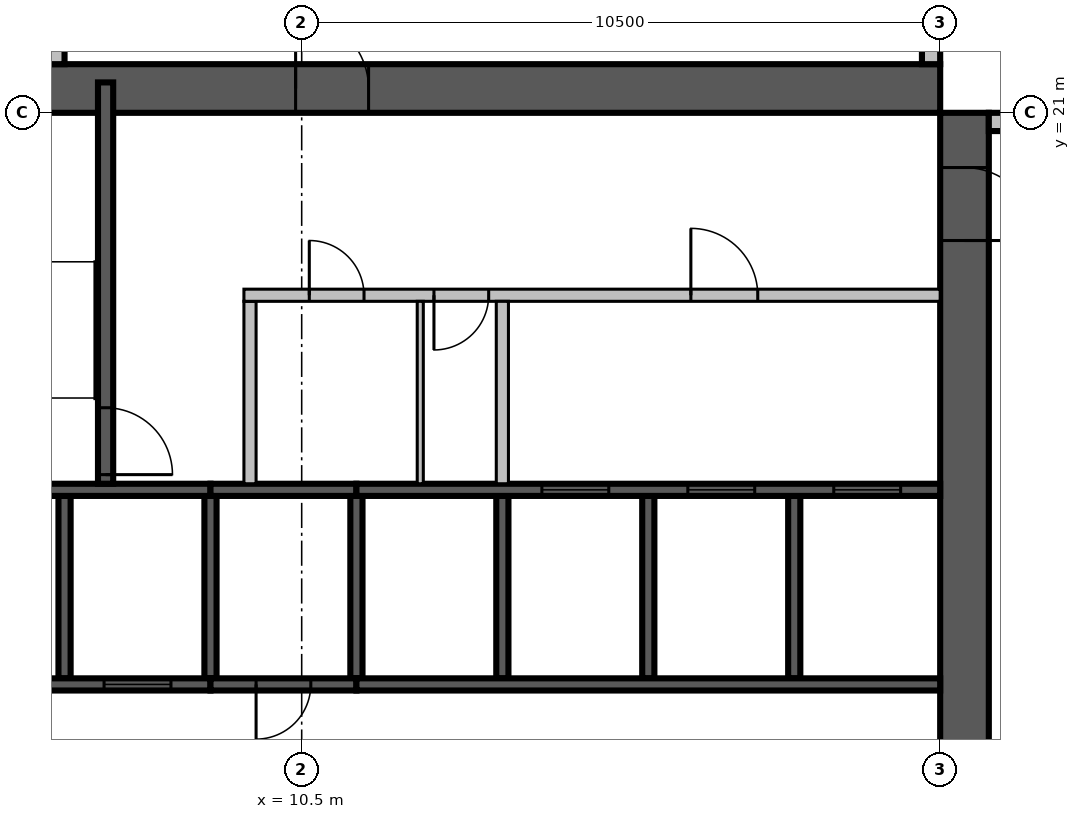
"""IFC4 building model, lengths in metres.
Left out: names, types, materials, properties, quantities, classifications, styles, units other than length and angle.
Written with IfcOpenShell. Run it as: python <this file> out.ifc"""

import sys

from ifc_helpers import new_model, si_unit, direction, frame, frame_2d, origin, place, context, subcontext, project, spatial, rectangle, extrude, source, transform, mapped, element, fill, save


model = new_model("IFC4")
c1 = context("Model", 3, precision=1e-05, world=origin(), true_north=direction((0.0, 1.0)))
c2 = subcontext(c1, "Body", "Model", "MODEL_VIEW")
j1 = project(units=[si_unit("LENGTHUNIT", "METRE"), si_unit("PLANEANGLEUNIT", "RADIAN")], contexts=[c1])
p1 = place(None, origin())
s1 = spatial("IfcSite", under=j1, at=p1, CompositionType="ELEMENT")
p2 = place(p1, origin())
s2 = spatial("IfcBuilding", under=s1, at=p2, CompositionType="ELEMENT")
p3 = place(p2, frame((0.0, 0.0, 181.6)))
s3 = spatial("IfcBuildingStorey", under=s2, at=p3, CompositionType="ELEMENT", Elevation=181.6)
m1 = source(origin(), c2, "Body", "SweptSolid", [
    extrude(rectangle(XDim=16.8, YDim=0.8, at=frame_2d((8.4, 0.0))), origin(), (0.0, 0.0, 1.0), 3.8),
])
p4 = place(p3, frame((21.4, 4.2, 0.0), z_axis=(0.0, 0.0, 1.0), x_axis=(0.0, 1.0, 0.0)))
e1 = element("IfcWall", 1, at=p4, inside=s3, PredefinedType="SHEAR", context=c2, shape_type="MappedRepresentation", body=[
    mapped(m1, transform((0.0, 0.0, 0.0), scale=1.0)),
])
m2 = source(origin(), c2, "Body", "SweptSolid", [
    extrude(rectangle(XDim=2.2, YDim=2.1, at=frame_2d((1.1, 1.05))), frame((0.0, 0.41, 0.0), z_axis=(0.0, -1.0, 0.0), x_axis=(1.0, 0.0, 0.0)), (0.0, 0.0, 1.0), 0.82),
])
p5 = place(p4, frame((4.2, 0.0, 0.0)))
e2 = element("IfcOpeningElement", 2, at=p5, cuts=e1, PredefinedType="OPENING", context=c2, shape_type="MappedRepresentation", body=[
    mapped(m2, transform((0.0, 0.0, 0.0), scale=1.0)),
])
m3 = source(origin(), c2, "Body", "SweptSolid", [
    extrude(rectangle(XDim=1.2, YDim=2.1, at=frame_2d((0.6, 1.05))), frame((0.0, 0.41, 0.0), z_axis=(0.0, -1.0, 0.0), x_axis=(1.0, 0.0, 0.0)), (0.0, 0.0, 1.0), 0.82),
])
p6 = place(p4, frame((14.7, 0.0, 0.0)))
e3 = element("IfcOpeningElement", 3, at=p6, cuts=e1, PredefinedType="OPENING", context=c2, shape_type="MappedRepresentation", body=[
    mapped(m3, transform((0.0, 0.0, 0.0), scale=1.0)),
])
p7 = place(p3, frame((4.2, 21.4, 0.0), z_axis=(0.0, 0.0, 1.0), x_axis=(1.0, 0.0, 0.0)))
e4 = element("IfcWall", 4, at=p7, inside=s3, PredefinedType="SHEAR", context=c2, shape_type="MappedRepresentation", body=[
    mapped(m1, transform((0.0, 0.0, 0.0), scale=1.0)),
])
p8 = place(p7, frame((6.2, 0.0, 0.0)))
e5 = element("IfcOpeningElement", 5, at=p8, cuts=e4, PredefinedType="OPENING", context=c2, shape_type="MappedRepresentation", body=[
    mapped(m3, transform((0.0, 0.0, 0.0), scale=1.0)),
])
m4 = source(origin(), c2, "Body", "SweptSolid", [
    extrude(rectangle(XDim=7.15, YDim=0.3, at=frame_2d((3.575, 0.0))), origin(), (0.0, 0.0, 1.0), 3.4),
])
p9 = place(p3, frame((28.95, 20.85, 0.0), z_axis=(0.0, 0.0, 1.0), x_axis=(-1.0, 0.0, 0.0)))
e6 = element("IfcWall", 6, at=p9, inside=s3, PredefinedType="STANDARD", context=c2, shape_type="MappedRepresentation", body=[
    mapped(m4, transform((0.0, 0.0, 0.0), scale=1.0)),
])
m5 = source(origin(), c2, "Body", "SweptSolid", [
    extrude(rectangle(XDim=3.0, YDim=2.3, at=frame_2d((1.5, 1.15))), frame((0.0, 0.16, 0.0), z_axis=(0.0, -1.0, 0.0), x_axis=(1.0, 0.0, 0.0)), (0.0, 0.0, 1.0), 0.32),
])
p10 = place(p9, frame((0.15, 0.0, 0.6)))
e7 = element("IfcOpeningElement", 7, at=p10, cuts=e6, PredefinedType="OPENING", context=c2, shape_type="MappedRepresentation", body=[
    mapped(m5, transform((0.0, 0.0, 0.0), scale=1.0)),
])
p11 = place(p3, frame((20.85, 21.8, 0.0), z_axis=(0.0, 0.0, 1.0), x_axis=(0.0, 1.0, 0.0)))
e8 = element("IfcWall", 8, at=p11, inside=s3, PredefinedType="STANDARD", context=c2, shape_type="MappedRepresentation", body=[
    mapped(m4, transform((0.0, 0.0, 0.0), scale=1.0)),
])
p12 = place(p11, frame((4.0, 0.0, 0.6)))
e9 = element("IfcOpeningElement", 9, at=p12, cuts=e8, PredefinedType="OPENING", context=c2, shape_type="MappedRepresentation", body=[
    mapped(m5, transform((0.0, 0.0, 0.0), scale=1.0)),
])
p13 = place(p3, frame((6.45, 30.4, 0.0), z_axis=(0.0, 0.0, 1.0), x_axis=(0.0, -1.0, 0.0)))
e10 = element("IfcWall", 10, at=p13, inside=s3, PredefinedType="STANDARD", context=c2, shape_type="SweptSolid", body=[
    extrude(rectangle(XDim=8.6, YDim=0.3, at=frame_2d((4.3, 0.0))), origin(), (0.0, 0.0, 1.0), 3.4),
])
m6 = source(origin(), c2, "Body", "SweptSolid", [
    extrude(rectangle(XDim=1.8, YDim=2.3, at=frame_2d((0.9, 1.15))), frame((0.0, 0.16, 0.0), z_axis=(0.0, -1.0, 0.0), x_axis=(1.0, 0.0, 0.0)), (0.0, 0.0, 1.0), 0.32),
])
p14 = place(p13, frame((1.438, 0.0, 0.6)))
e11 = element("IfcOpeningElement", 11, at=p14, cuts=e10, PredefinedType="OPENING", context=c2, shape_type="MappedRepresentation", body=[
    mapped(m6, transform((0.0, 0.0, 0.0), scale=1.0)),
])
m7 = source(origin(), c2, "Body", "SweptSolid", [
    extrude(rectangle(XDim=1.2, YDim=2.3, at=frame_2d((0.6, 1.15))), frame((0.0, 0.16, 0.0), z_axis=(0.0, -1.0, 0.0), x_axis=(1.0, 0.0, 0.0)), (0.0, 0.0, 1.0), 0.32),
])
p15 = place(p13, frame((5.013, 0.0, 0.6)))
e12 = element("IfcOpeningElement", 12, at=p15, cuts=e10, PredefinedType="OPENING", context=c2, shape_type="MappedRepresentation", body=[
    mapped(m7, transform((0.0, 0.0, 0.0), scale=1.0)),
])
m8 = source(origin(), c2, "Body", "SweptSolid", [
    extrude(rectangle(XDim=3.0, YDim=0.2, at=frame_2d((1.5, 0.0))), origin(), (0.0, 0.0, 1.0), 3.8),
])
p16 = place(p3, frame((6.6, 11.7, 0.0), z_axis=(0.0, 0.0, 1.0), x_axis=(0.0, 1.0, 0.0)))
e13 = element("IfcWall", 13, at=p16, inside=s3, PredefinedType="SOLIDWALL", context=c2, shape_type="MappedRepresentation", body=[
    mapped(m8, transform((0.0, 0.0, 0.0), scale=1.0)),
])
m9 = source(origin(), c2, "Body", "SweptSolid", [
    extrude(rectangle(XDim=3.0, YDim=0.2, at=frame_2d((1.5, 0.0))), origin(), (0.0, 0.0, 1.0), 3.4),
])
for number, where, z_axis, x_axis in (
    (14, (9.0, 11.7, 0.0), (0.0, 0.0, 1.0), (0.0, 1.0, 0.0)),
    (15, (11.4, 11.7, 0.0), (0.0, 0.0, 1.0), (0.0, 1.0, 0.0)),
):
    element("IfcWall", number, at=place(p3, frame(where, z_axis=z_axis, x_axis=x_axis)), inside=s3, PredefinedType="SOLIDWALL", context=c2, shape_type="MappedRepresentation", body=[
        mapped(m9, transform((0.0, 0.0, 0.0), scale=1.0)),
    ])
for number, where, z_axis, x_axis in (
    (16, (13.8, 11.7, 0.0), (0.0, 0.0, 1.0), (0.0, 1.0, 0.0)),
    (17, (16.2, 11.7, 0.0), (0.0, 0.0, 1.0), (0.0, 1.0, 0.0)),
    (18, (18.6, 11.7, 0.0), (0.0, 0.0, 1.0), (0.0, 1.0, 0.0)),
):
    element("IfcWall", number, at=place(p3, frame(where, z_axis=z_axis, x_axis=x_axis)), inside=s3, PredefinedType="SOLIDWALL", context=c2, shape_type="MappedRepresentation", body=[
        mapped(m8, transform((0.0, 0.0, 0.0), scale=1.0)),
    ])
m10 = source(origin(), c2, "Body", "SweptSolid", [
    extrude(rectangle(XDim=4.8, YDim=0.2, at=frame_2d((2.4, 0.0))), origin(), (0.0, 0.0, 1.0), 3.8),
])
p17 = place(p3, frame((4.2, 11.6, 0.0), z_axis=(0.0, 0.0, 1.0), x_axis=(1.0, 0.0, 0.0)))
e19 = element("IfcWall", 19, at=p17, inside=s3, PredefinedType="SOLIDWALL", context=c2, shape_type="MappedRepresentation", body=[
    mapped(m10, transform((0.0, 0.0, 0.0), scale=1.0)),
])
m11 = source(origin(), c2, "Body", "SweptSolid", [
    extrude(rectangle(XDim=1.1, YDim=2.1, at=frame_2d((0.55, 1.05))), frame((0.0, 0.11, 0.0), z_axis=(0.0, -1.0, 0.0), x_axis=(1.0, 0.0, 0.0)), (0.0, 0.0, 1.0), 0.22),
])
p18 = place(p17, frame((0.65, 0.0, 0.0)))
e20 = element("IfcOpeningElement", 20, at=p18, cuts=e19, PredefinedType="OPENING", context=c2, shape_type="MappedRepresentation", body=[
    mapped(m11, transform((0.0, 0.0, 0.0), scale=1.0)),
])
p19 = place(p17, frame((3.05, 0.0, 0.0)))
e21 = element("IfcOpeningElement", 21, at=p19, cuts=e19, PredefinedType="OPENING", context=c2, shape_type="MappedRepresentation", body=[
    mapped(m11, transform((0.0, 0.0, 0.0), scale=1.0)),
])
m12 = source(origin(), c2, "Body", "SweptSolid", [
    extrude(rectangle(XDim=2.4, YDim=0.2, at=frame_2d((1.2, 0.0))), origin(), (0.0, 0.0, 1.0), 3.4),
])
p20 = place(p3, frame((9.0, 11.6, 0.0), z_axis=(0.0, 0.0, 1.0), x_axis=(1.0, 0.0, 0.0)))
e22 = element("IfcWall", 22, at=p20, inside=s3, PredefinedType="SOLIDWALL", context=c2, shape_type="MappedRepresentation", body=[
    mapped(m12, transform((0.0, 0.0, 0.0), scale=1.0)),
])
m13 = source(origin(), c2, "Body", "SweptSolid", [
    extrude(rectangle(XDim=0.9, YDim=2.1, at=frame_2d((0.45, 1.05))), frame((0.0, 0.11, 0.0), z_axis=(0.0, -1.0, 0.0), x_axis=(1.0, 0.0, 0.0)), (0.0, 0.0, 1.0), 0.22),
])
p21 = place(p20, frame((0.75, 0.0, 0.0)))
e23 = element("IfcOpeningElement", 23, at=p21, cuts=e22, PredefinedType="OPENING", context=c2, shape_type="MappedRepresentation", body=[
    mapped(m13, transform((0.0, 0.0, 0.0), scale=1.0)),
])
m14 = source(origin(), c2, "Body", "SweptSolid", [
    extrude(rectangle(XDim=9.6, YDim=0.2, at=frame_2d((4.8, 0.0))), origin(), (0.0, 0.0, 1.0), 3.8),
])
p22 = place(p3, frame((11.4, 11.6, 0.0), z_axis=(0.0, 0.0, 1.0), x_axis=(1.0, 0.0, 0.0)))
e24 = element("IfcWall", 24, at=p22, inside=s3, PredefinedType="SOLIDWALL", context=c2, shape_type="MappedRepresentation", body=[
    mapped(m14, transform((0.0, 0.0, 0.0), scale=1.0)),
])
p23 = place(p3, frame((4.2, 14.8, 0.0), z_axis=(0.0, 0.0, 1.0), x_axis=(1.0, 0.0, 0.0)))
e25 = element("IfcWall", 25, at=p23, inside=s3, PredefinedType="SOLIDWALL", context=c2, shape_type="MappedRepresentation", body=[
    mapped(m10, transform((0.0, 0.0, 0.0), scale=1.0)),
])
p24 = place(p3, frame((9.0, 14.8, 0.0), z_axis=(0.0, 0.0, 1.0), x_axis=(1.0, 0.0, 0.0)))
e26 = element("IfcWall", 26, at=p24, inside=s3, PredefinedType="SOLIDWALL", context=c2, shape_type="MappedRepresentation", body=[
    mapped(m12, transform((0.0, 0.0, 0.0), scale=1.0)),
])
p25 = place(p3, frame((11.4, 14.8, 0.0), z_axis=(0.0, 0.0, 1.0), x_axis=(1.0, 0.0, 0.0)))
e27 = element("IfcWall", 27, at=p25, inside=s3, PredefinedType="SOLIDWALL", context=c2, shape_type="MappedRepresentation", body=[
    mapped(m14, transform((0.0, 0.0, 0.0), scale=1.0)),
])
p26 = place(p25, frame((3.05, 0.0, 0.0)))
e28 = element("IfcOpeningElement", 28, at=p26, cuts=e27, PredefinedType="OPENING", context=c2, shape_type="MappedRepresentation", body=[
    mapped(m11, transform((0.0, 0.0, 0.0), scale=1.0)),
])
p27 = place(p25, frame((5.45, 0.0, 0.0)))
e29 = element("IfcOpeningElement", 29, at=p27, cuts=e27, PredefinedType="OPENING", context=c2, shape_type="MappedRepresentation", body=[
    mapped(m11, transform((0.0, 0.0, 0.0), scale=1.0)),
])
p28 = place(p25, frame((7.85, 0.0, 0.0)))
e30 = element("IfcOpeningElement", 30, at=p28, cuts=e27, PredefinedType="OPENING", context=c2, shape_type="MappedRepresentation", body=[
    mapped(m11, transform((0.0, 0.0, 0.0), scale=1.0)),
])
m15 = source(origin(), c2, "Body", "SweptSolid", [
    extrude(rectangle(XDim=6.6, YDim=0.25, at=frame_2d((3.3, 0.0))), origin(), (0.0, 0.0, 1.0), 3.4),
])
p29 = place(p3, frame((7.275, 14.9, 0.0), z_axis=(0.0, 0.0, 1.0), x_axis=(0.0, 1.0, 0.0)))
e31 = element("IfcWall", 31, at=p29, inside=s3, PredefinedType="SOLIDWALL", context=c2, shape_type="MappedRepresentation", body=[
    mapped(m15, transform((0.0, 0.0, 0.0), scale=1.0)),
])
m16 = source(origin(), c2, "Body", "SweptSolid", [
    extrude(rectangle(XDim=1.1, YDim=2.1, at=frame_2d((0.55, 1.05))), frame((0.0, 0.135, 0.0), z_axis=(0.0, -1.0, 0.0), x_axis=(1.0, 0.0, 0.0)), (0.0, 0.0, 1.0), 0.27),
])
p30 = place(p29, frame((0.15, 0.0, 0.0)))
e32 = element("IfcOpeningElement", 32, at=p30, cuts=e31, PredefinedType="OPENING", context=c2, shape_type="MappedRepresentation", body=[
    mapped(m16, transform((0.0, 0.0, 0.0), scale=1.0)),
])
m17 = source(origin(), c2, "Body", "SweptSolid", [
    extrude(rectangle(XDim=3.0, YDim=0.2, at=frame_2d((1.5, 0.0))), origin(), (0.0, 0.0, 1.0), 3.4),
])
p31 = place(p3, frame((9.65, 14.9, 0.0), z_axis=(0.0, 0.0, 1.0), x_axis=(0.0, 1.0, 0.0)))
e33 = element("IfcWall", 33, at=p31, inside=s3, PredefinedType="PARTITIONING", context=c2, shape_type="MappedRepresentation", body=[
    mapped(m17, transform((0.0, 0.0, 0.0), scale=1.0)),
])
m18 = source(origin(), c2, "Body", "SweptSolid", [
    extrude(rectangle(XDim=11.45, YDim=0.2, at=frame_2d((5.725, 0.0))), origin(), (0.0, 0.0, 1.0), 3.4),
])
p32 = place(p3, frame((9.55, 18.0, 0.0), z_axis=(0.0, 0.0, 1.0), x_axis=(1.0, 0.0, 0.0)))
e34 = element("IfcWall", 34, at=p32, inside=s3, PredefinedType="PARTITIONING", context=c2, shape_type="MappedRepresentation", body=[
    mapped(m18, transform((0.0, 0.0, 0.0), scale=1.0)),
])
p33 = place(p32, frame((1.075, 0.0, 0.0)))
e35 = element("IfcOpeningElement", 35, at=p33, cuts=e34, PredefinedType="OPENING", context=c2, shape_type="MappedRepresentation", body=[
    mapped(m13, transform((0.0, 0.0, 0.0), scale=1.0)),
])
p34 = place(p32, frame((3.125, 0.0, 0.0)))
e36 = element("IfcOpeningElement", 36, at=p34, cuts=e34, PredefinedType="OPENING", context=c2, shape_type="MappedRepresentation", body=[
    mapped(m13, transform((0.0, 0.0, 0.0), scale=1.0)),
])
p35 = place(p32, frame((7.35, 0.0, 0.0)))
e37 = element("IfcOpeningElement", 37, at=p35, cuts=e34, PredefinedType="OPENING", context=c2, shape_type="MappedRepresentation", body=[
    mapped(m11, transform((0.0, 0.0, 0.0), scale=1.0)),
])
p36 = place(p3, frame((13.8, 14.9, 0.0), z_axis=(0.0, 0.0, 1.0), x_axis=(0.0, 1.0, 0.0)))
e38 = element("IfcWall", 38, at=p36, inside=s3, PredefinedType="PARTITIONING", context=c2, shape_type="MappedRepresentation", body=[
    mapped(m17, transform((0.0, 0.0, 0.0), scale=1.0)),
])
m19 = source(origin(), c2, "Body", "SweptSolid", [
    extrude(rectangle(XDim=3.0, YDim=0.1, at=frame_2d((1.5, 0.0))), origin(), (0.0, 0.0, 1.0), 3.4),
])
p37 = place(p3, frame((12.45, 14.9, 0.0), z_axis=(0.0, 0.0, 1.0), x_axis=(0.0, 1.0, 0.0)))
e39 = element("IfcWall", 39, at=p37, inside=s3, PredefinedType="PARTITIONING", context=c2, shape_type="MappedRepresentation", body=[
    mapped(m19, transform((0.0, 0.0, 0.0), scale=1.0)),
])
m20 = source(origin(), c2, "Body", "SweptSolid", [
    extrude(rectangle(XDim=1.1, YDim=2.1, at=frame_2d((0.55, 1.05))), frame((0.0, 0.025, 0.0), z_axis=(0.0, -1.0, 0.0), x_axis=(1.0, 0.0, 0.0)), (0.0, 0.0, 1.0), 0.05),
])
p38 = place(p19, origin())
e40 = element("IfcDoor", 40, at=p38, inside=s3, OperationType="SLIDING_TO_LEFT", PredefinedType="DOOR", context=c2, shape_type="MappedRepresentation", body=[
    mapped(m20, transform((0.0, 0.0, 0.0), scale=1.0)),
])
fill(e21, e40)
m21 = source(origin(), c2, "Body", "SweptSolid", [
    extrude(rectangle(XDim=0.9, YDim=2.1, at=frame_2d((0.45, 1.05))), frame((0.0, 0.025, 0.0), z_axis=(0.0, -1.0, 0.0), x_axis=(1.0, 0.0, 0.0)), (0.0, 0.0, 1.0), 0.05),
])
p39 = place(p21, origin())
e41 = element("IfcDoor", 41, at=p39, inside=s3, OperationType="SINGLE_SWING_RIGHT", PredefinedType="DOOR", context=c2, shape_type="MappedRepresentation", body=[
    mapped(m21, transform((0.0, 0.0, 0.0), scale=1.0)),
])
fill(e23, e41)
p40 = place(p26, origin())
e42 = element("IfcDoor", 42, at=p40, inside=s3, OperationType="SLIDING_TO_LEFT", PredefinedType="DOOR", context=c2, shape_type="MappedRepresentation", body=[
    mapped(m20, transform((0.0, 0.0, 0.0), scale=1.0)),
])
fill(e28, e42)
p41 = place(p27, origin())
e43 = element("IfcDoor", 43, at=p41, inside=s3, OperationType="SLIDING_TO_LEFT", PredefinedType="DOOR", context=c2, shape_type="MappedRepresentation", body=[
    mapped(m20, transform((0.0, 0.0, 0.0), scale=1.0)),
])
fill(e29, e43)
p42 = place(p28, origin())
e44 = element("IfcDoor", 44, at=p42, inside=s3, OperationType="SLIDING_TO_LEFT", PredefinedType="DOOR", context=c2, shape_type="MappedRepresentation", body=[
    mapped(m20, transform((0.0, 0.0, 0.0), scale=1.0)),
])
fill(e30, e44)
p43 = place(p30, origin())
e45 = element("IfcDoor", 45, at=p43, inside=s3, OperationType="SINGLE_SWING_RIGHT", PredefinedType="DOOR", context=c2, shape_type="MappedRepresentation", body=[
    mapped(m20, transform((0.0, 0.0, 0.0), scale=1.0)),
])
fill(e32, e45)
p44 = place(p33, origin())
e46 = element("IfcDoor", 46, at=p44, inside=s3, OperationType="SINGLE_SWING_LEFT", PredefinedType="DOOR", context=c2, shape_type="MappedRepresentation", body=[
    mapped(m21, transform((0.0, 0.0, 0.0), scale=1.0)),
])
fill(e35, e46)
p45 = place(p34, origin())
e47 = element("IfcDoor", 47, at=p45, inside=s3, OperationType="SINGLE_SWING_RIGHT", PredefinedType="DOOR", context=c2, shape_type="MappedRepresentation", body=[
    mapped(m21, transform((0.0, 0.0, 0.0), scale=1.0)),
])
fill(e36, e47)
p46 = place(p35, origin())
e48 = element("IfcDoor", 48, at=p46, inside=s3, OperationType="SINGLE_SWING_LEFT", PredefinedType="DOOR", context=c2, shape_type="MappedRepresentation", body=[
    mapped(m20, transform((0.0, 0.0, 0.0), scale=1.0)),
])
fill(e37, e48)
m22 = source(origin(), c2, "Body", "SweptSolid", [
    extrude(rectangle(XDim=1.2, YDim=2.1, at=frame_2d((0.6, 1.05))), frame((0.0, 0.025, 0.0), z_axis=(0.0, -1.0, 0.0), x_axis=(1.0, 0.0, 0.0)), (0.0, 0.0, 1.0), 0.05),
])
p47 = place(p8, origin())
e49 = element("IfcDoor", 49, at=p47, inside=s3, OperationType="SINGLE_SWING_LEFT", PredefinedType="DOOR", context=c2, shape_type="MappedRepresentation", body=[
    mapped(m22, transform((0.0, 0.0, 0.0), scale=1.0)),
])
fill(e5, e49)
p48 = place(p6, origin())
e50 = element("IfcDoor", 50, at=p48, inside=s3, OperationType="SINGLE_SWING_RIGHT", PredefinedType="DOOR", context=c2, shape_type="MappedRepresentation", body=[
    mapped(m22, transform((0.0, 0.0, 0.0), scale=1.0)),
])
fill(e3, e50)
save(model, sys.argv[1])
